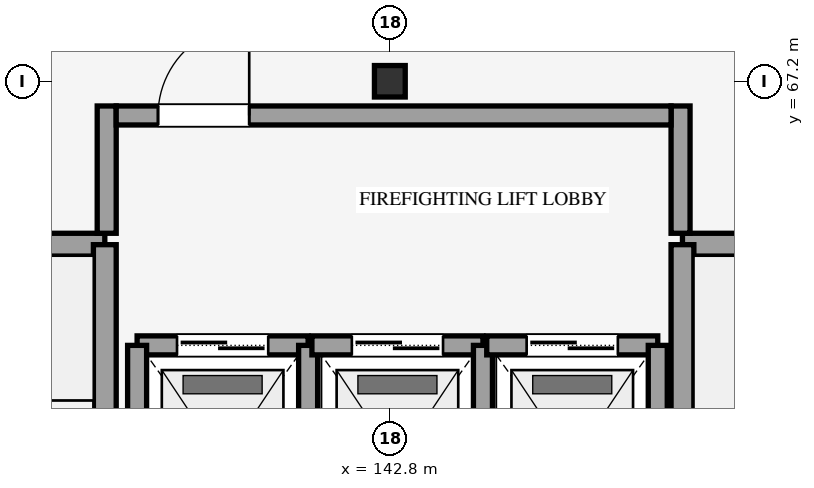
"""IFC4 building model, lengths in metres.
Left out: names, types, materials, properties, quantities, classifications, styles, units other than length and angle.
Written with IfcOpenShell. Run it as: python <this file> out.ifc"""

import sys

from ifc_helpers import new_model, si_unit, direction, frame, frame_2d, origin, origin_2d, place, context, subcontext, project, spatial, rectangle, i_section, extrude, element, fill, save


model = new_model("IFC4")
c1 = context("Model", 3, precision=1e-05, world=origin(), true_north=direction((0.0, 1.0)))
c2 = subcontext(c1, "Body", "Model", "MODEL_VIEW")
j1 = project(units=[si_unit("LENGTHUNIT", "METRE"), si_unit("PLANEANGLEUNIT", "RADIAN")], contexts=[c1])
p1 = place(None, origin())
s1 = spatial("IfcSite", under=j1, at=p1, CompositionType="ELEMENT")
p2 = place(p1, origin())
s2 = spatial("IfcBuilding", under=s1, at=p2, CompositionType="ELEMENT")
p3 = place(p2, frame((0.0, 0.0, 5.4)))
s3 = spatial("IfcBuildingStorey", under=s2, at=p3, CompositionType="ELEMENT", Elevation=5.4)
p4 = place(p3, frame((142.8, 67.2, 0.0), z_axis=(0.0, 0.0, 1.0), x_axis=(1.0, 0.0, 0.0)))
e1 = element("IfcColumn", 1, at=p4, inside=s3, PredefinedType="COLUMN", context=c2, shape_type="SweptSolid", body=[
    extrude(i_section(OverallWidth=0.405, OverallDepth=0.414, WebThickness=0.018, FlangeThickness=0.028, FilletRadius=0.022, at=origin_2d()), origin(), (0.0, 0.0, 1.0), 4.5),
])
p5 = place(p3, frame((135.05, 65.05, 0.0), z_axis=(0.0, 0.0, 1.0), x_axis=(1.0, 0.0, 0.0)))
e2 = element("IfcWall", 2, at=p5, inside=s3, PredefinedType="SHEAR", context=c2, shape_type="SweptSolid", body=[
    extrude(rectangle(XDim=4.0, YDim=0.3, at=frame_2d((2.0, 0.0))), origin(), (0.0, 0.0, 1.0), 4.5),
])
p6 = place(p3, frame((139.05, 50.75, 0.0), z_axis=(0.0, 0.0, 1.0), x_axis=(0.0, 1.0, 0.0)))
e3 = element("IfcWall", 3, at=p6, inside=s3, PredefinedType="SHEAR", context=c2, shape_type="SweptSolid", body=[
    extrude(rectangle(XDim=14.3, YDim=0.3, at=frame_2d((7.15, 0.0))), origin(), (0.0, 0.0, 1.0), 4.5),
])
p7 = place(p3, frame((146.65, 65.05, 0.0), z_axis=(0.0, 0.0, 1.0), x_axis=(1.0, 0.0, 0.0)))
e4 = element("IfcWall", 4, at=p7, inside=s3, PredefinedType="SHEAR", context=c2, shape_type="SweptSolid", body=[
    extrude(rectangle(XDim=4.0, YDim=0.3, at=frame_2d((2.0, 0.0))), origin(), (0.0, 0.0, 1.0), 4.5),
])
p8 = place(p3, frame((146.65, 50.75, 0.0), z_axis=(0.0, 0.0, 1.0), x_axis=(0.0, 1.0, 0.0)))
e5 = element("IfcWall", 5, at=p8, inside=s3, PredefinedType="SHEAR", context=c2, shape_type="SweptSolid", body=[
    extrude(rectangle(XDim=14.3, YDim=0.3, at=frame_2d((7.15, 0.0))), origin(), (0.0, 0.0, 1.0), 4.5),
])
p9 = place(p3, frame((139.475, 63.725, 0.0), z_axis=(0.0, 0.0, 1.0), x_axis=(1.0, 0.0, 0.0)))
e6 = element("IfcWall", 6, at=p9, inside=s3, PredefinedType="SHEAR", context=c2, shape_type="SweptSolid", body=[
    extrude(rectangle(XDim=2.25, YDim=0.25, at=frame_2d((1.125, 0.0))), origin(), (0.0, 0.0, 1.0), 4.24),
])
p10 = place(p9, frame((0.525, 0.0, 0.0)))
e7 = element("IfcOpeningElement", 7, at=p10, cuts=e6, PredefinedType="OPENING", context=c2, shape_type="SweptSolid", body=[
    extrude(rectangle(XDim=1.2, YDim=2.18, at=frame_2d((0.6, 1.09))), frame((0.0, 0.135, 0.0), z_axis=(0.0, -1.0, 0.0), x_axis=(1.0, 0.0, 0.0)), (0.0, 0.0, 1.0), 0.27),
])
for number, where, z_axis, x_axis in (
    (8, (139.475, 60.675, 0.0), (0.0, 0.0, 1.0), (0.0, 1.0, 0.0)),
    (9, (141.725, 60.675, 0.0), (0.0, 0.0, 1.0), (0.0, 1.0, 0.0)),
):
    element("IfcWall", number, at=place(p3, frame(where, z_axis=z_axis, x_axis=x_axis)), inside=s3, PredefinedType="SHEAR", context=c2, shape_type="SweptSolid", body=[
        extrude(rectangle(XDim=3.05, YDim=0.25, at=frame_2d((1.525, 0.0))), origin(), (0.0, 0.0, 1.0), 4.24),
    ])
p11 = place(p3, frame((141.775, 63.725, 0.0), z_axis=(0.0, 0.0, 1.0), x_axis=(1.0, 0.0, 0.0)))
e10 = element("IfcWall", 10, at=p11, inside=s3, PredefinedType="SHEAR", context=c2, shape_type="SweptSolid", body=[
    extrude(rectangle(XDim=2.25, YDim=0.25, at=frame_2d((1.125, 0.0))), origin(), (0.0, 0.0, 1.0), 4.24),
])
p12 = place(p11, frame((0.525, 0.0, 0.0)))
e11 = element("IfcOpeningElement", 11, at=p12, cuts=e10, PredefinedType="OPENING", context=c2, shape_type="SweptSolid", body=[
    extrude(rectangle(XDim=1.2, YDim=2.18, at=frame_2d((0.6, 1.09))), frame((0.0, 0.135, 0.0), z_axis=(0.0, -1.0, 0.0), x_axis=(1.0, 0.0, 0.0)), (0.0, 0.0, 1.0), 0.27),
])
p13 = place(p3, frame((144.025, 60.675, 0.0), z_axis=(0.0, 0.0, 1.0), x_axis=(0.0, 1.0, 0.0)))
e12 = element("IfcWall", 12, at=p13, inside=s3, PredefinedType="SHEAR", context=c2, shape_type="SweptSolid", body=[
    extrude(rectangle(XDim=3.05, YDim=0.25, at=frame_2d((1.525, 0.0))), origin(), (0.0, 0.0, 1.0), 4.24),
])
p14 = place(p3, frame((144.075, 63.725, 0.0), z_axis=(0.0, 0.0, 1.0), x_axis=(1.0, 0.0, 0.0)))
e13 = element("IfcWall", 13, at=p14, inside=s3, PredefinedType="SHEAR", context=c2, shape_type="SweptSolid", body=[
    extrude(rectangle(XDim=2.25, YDim=0.25, at=frame_2d((1.125, 0.0))), origin(), (0.0, 0.0, 1.0), 4.24),
])
p15 = place(p14, frame((0.525, 0.0, 0.0)))
e14 = element("IfcOpeningElement", 14, at=p15, cuts=e13, PredefinedType="OPENING", context=c2, shape_type="SweptSolid", body=[
    extrude(rectangle(XDim=1.2, YDim=2.18, at=frame_2d((0.6, 1.09))), frame((0.0, 0.135, 0.0), z_axis=(0.0, -1.0, 0.0), x_axis=(1.0, 0.0, 0.0)), (0.0, 0.0, 1.0), 0.27),
])
p16 = place(p3, frame((146.325, 60.675, 0.0), z_axis=(0.0, 0.0, 1.0), x_axis=(0.0, 1.0, 0.0)))
e15 = element("IfcWall", 15, at=p16, inside=s3, PredefinedType="SHEAR", context=c2, shape_type="SweptSolid", body=[
    extrude(rectangle(XDim=3.05, YDim=0.25, at=frame_2d((1.525, 0.0))), origin(), (0.0, 0.0, 1.0), 4.24),
])
for number, where, z_axis, x_axis in (
    (16, (139.075, 65.2, 0.0), (0.0, 0.0, 1.0), (0.0, 1.0, 0.0)),
    (17, (146.625, 65.2, 0.0), (0.0, 0.0, 1.0), (0.0, 1.0, 0.0)),
):
    element("IfcWall", number, at=place(p3, frame(where, z_axis=z_axis, x_axis=x_axis)), inside=s3, PredefinedType="SHEAR", context=c2, shape_type="SweptSolid", body=[
        extrude(rectangle(XDim=1.675, YDim=0.25, at=frame_2d((0.837, 0.0))), origin(), (0.0, 0.0, 1.0), 4.24),
    ])
p17 = place(p3, frame((139.2, 66.75, 0.0), z_axis=(0.0, 0.0, 1.0), x_axis=(1.0, 0.0, 0.0)))
e18 = element("IfcWall", 18, at=p17, inside=s3, PredefinedType="SHEAR", context=c2, shape_type="SweptSolid", body=[
    extrude(rectangle(XDim=7.3, YDim=0.25, at=frame_2d((3.65, 0.0))), origin(), (0.0, 0.0, 1.0), 4.24),
])
p18 = place(p17, frame((0.55, 0.0, 0.0)))
e19 = element("IfcOpeningElement", 19, at=p18, cuts=e18, PredefinedType="OPENING", context=c2, shape_type="SweptSolid", body=[
    extrude(rectangle(XDim=1.2, YDim=2.15, at=frame_2d((0.6, 1.075))), frame((0.0, 0.135, 0.0), z_axis=(0.0, -1.0, 0.0), x_axis=(1.0, 0.0, 0.0)), (0.0, 0.0, 1.0), 0.27),
])
p19 = place(p10, origin())
e20 = element("IfcDoor", 20, at=p19, inside=s3, OperationType="DOUBLE_DOOR_SLIDING", PredefinedType="DOOR", context=c2, shape_type="SweptSolid", body=[
    extrude(rectangle(XDim=1.2, YDim=2.18, at=frame_2d((0.6, 1.09))), frame((0.0, 0.025, 0.0), z_axis=(0.0, -1.0, 0.0), x_axis=(1.0, 0.0, 0.0)), (0.0, 0.0, 1.0), 0.05),
])
fill(e7, e20)
p20 = place(p12, origin())
e21 = element("IfcDoor", 21, at=p20, inside=s3, OperationType="DOUBLE_DOOR_SLIDING", PredefinedType="DOOR", context=c2, shape_type="SweptSolid", body=[
    extrude(rectangle(XDim=1.2, YDim=2.18, at=frame_2d((0.6, 1.09))), frame((0.0, 0.025, 0.0), z_axis=(0.0, -1.0, 0.0), x_axis=(1.0, 0.0, 0.0)), (0.0, 0.0, 1.0), 0.05),
])
fill(e11, e21)
p21 = place(p15, origin())
e22 = element("IfcDoor", 22, at=p21, inside=s3, OperationType="DOUBLE_DOOR_SLIDING", PredefinedType="DOOR", context=c2, shape_type="SweptSolid", body=[
    extrude(rectangle(XDim=1.2, YDim=2.18, at=frame_2d((0.6, 1.09))), frame((0.0, 0.025, 0.0), z_axis=(0.0, -1.0, 0.0), x_axis=(1.0, 0.0, 0.0)), (0.0, 0.0, 1.0), 0.05),
])
fill(e14, e22)
p22 = place(p18, origin())
e23 = element("IfcDoor", 23, at=p22, inside=s3, OperationType="SINGLE_SWING_RIGHT", PredefinedType="DOOR", context=c2, shape_type="SweptSolid", body=[
    extrude(rectangle(XDim=1.2, YDim=2.15, at=frame_2d((0.6, 1.075))), frame((0.0, 0.025, 0.0), z_axis=(0.0, -1.0, 0.0), x_axis=(1.0, 0.0, 0.0)), (0.0, 0.0, 1.0), 0.05),
])
fill(e19, e23)
save(model, sys.argv[1])
